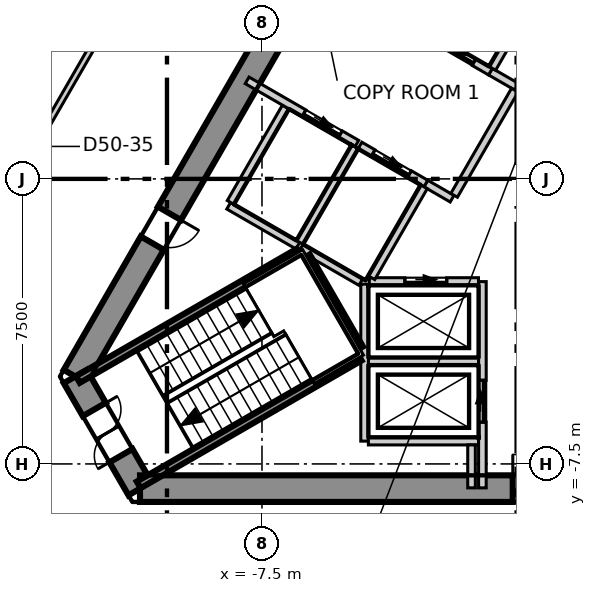
"""IFC4 building model, lengths in metres.
Left out: names, types, materials, properties, quantities, classifications, styles, units other than length and angle.
Written with IfcOpenShell. Run it as: python <this file> out.ifc"""

import sys

from ifc_helpers import new_model, si_unit, direction, frame, frame_2d, origin, place, context, subcontext, project, spatial, polyline, rectangle, outline, extrude, element, fill, save


model = new_model("IFC4")
c1 = context("Model", 3, precision=1e-05, world=origin(), true_north=direction((0.0, 1.0)))
c2 = subcontext(c1, "Body", "Model", "MODEL_VIEW")
j1 = project(units=[si_unit("LENGTHUNIT", "METRE"), si_unit("PLANEANGLEUNIT", "RADIAN")], contexts=[c1])
p1 = place(None, origin())
s1 = spatial("IfcSite", under=j1, at=p1, CompositionType="ELEMENT")
p2 = place(p1, origin())
s2 = spatial("IfcBuilding", under=s1, at=p2, CompositionType="ELEMENT")
p3 = place(p2, frame((0.0, 0.0, 215.3)))
s3 = spatial("IfcBuildingStorey", under=s2, at=p3, CompositionType="ELEMENT", Elevation=215.3)
p4 = place(p3, frame((-1.703, 13.35, -0.3), z_axis=(0.0, 0.0, 1.0), x_axis=(-0.500011533395, -0.866018744874, 0.0)))
e1 = element("IfcWall", 1, at=p4, inside=s3, PredefinedType="SHEAR", context=c2, shape_type="SweptSolid", body=[
    extrude(outline(polyline([(-0.202, -0.35), (1.782, -0.35), (3.766, -0.35), (5.75, -0.35), (7.734, -0.35), (9.718, -0.35), (11.702, -0.35), (13.686, -0.35), (15.67, -0.35), (17.654, -0.35), (19.638, -0.35), (21.622, -0.35), (21.218, 0.35), (19.307, 0.35), (17.397, 0.35), (15.486, 0.35), (13.576, 0.35), (11.665, 0.35), (9.755, 0.35), (7.844, 0.35), (5.934, 0.35), (4.023, 0.35), (2.113, 0.35), (0.202, 0.35), (-0.202, -0.35)])), origin(), (0.0, 0.0, 1.0), 4.0),
])
p5 = place(p4, frame((10.16, 0.0, 0.3)))
e2 = element("IfcOpeningElement", 2, at=p5, cuts=e1, PredefinedType="OPENING", context=c2, shape_type="SweptSolid", body=[
    extrude(rectangle(XDim=1.1, YDim=2.1, at=frame_2d((0.55, 1.05))), frame((0.0, 0.36, 0.0), z_axis=(0.0, -1.0, 0.0), x_axis=(1.0, 0.0, 0.0)), (0.0, 0.0, 1.0), 0.72),
])
p6 = place(p4, frame((16.465, 0.0, 0.3)))
e3 = element("IfcOpeningElement", 3, at=p6, cuts=e1, PredefinedType="OPENING", context=c2, shape_type="SweptSolid", body=[
    extrude(rectangle(XDim=0.9, YDim=2.1, at=frame_2d((0.45, 1.05))), frame((0.0, 0.36, 0.0), z_axis=(0.0, -1.0, 0.0), x_axis=(1.0, 0.0, 0.0)), (0.0, 0.0, 1.0), 0.72),
])
p7 = place(p4, frame((4.005, 0.0, 0.3)))
e4 = element("IfcOpeningElement", 4, at=p7, cuts=e1, PredefinedType="OPENING", context=c2, shape_type="SweptSolid", body=[
    extrude(rectangle(XDim=1.0, YDim=2.1, at=frame_2d((0.5, 1.05))), frame((0.0, 0.36, 0.0), z_axis=(0.0, -1.0, 0.0), x_axis=(1.0, 0.0, 0.0)), (0.0, 0.0, 1.0), 0.72),
])
p8 = place(p3, frame((-12.413, -5.2, -0.3), z_axis=(0.0, 0.0, 1.0), x_axis=(0.49999337185, -0.866029230515, 0.0)))
e5 = element("IfcWall", 5, at=p8, inside=s3, PredefinedType="SHEAR", context=c2, shape_type="SweptSolid", body=[
    extrude(outline(polyline([(-0.202, -0.35), (1.703, -0.35), (3.608, -0.35), (3.204, 0.35), (1.703, 0.35), (0.202, 0.35), (-0.202, -0.35)])), origin(), (0.0, 0.0, 1.0), 4.0),
])
p9 = place(p8, frame((1.003, 0.0, 0.3)))
e6 = element("IfcOpeningElement", 6, at=p9, cuts=e5, PredefinedType="OPENING", context=c2, shape_type="SweptSolid", body=[
    extrude(rectangle(XDim=1.4, YDim=2.1, at=frame_2d((0.7, 1.05))), frame((0.0, 0.36, 0.0), z_axis=(0.0, -1.0, 0.0), x_axis=(1.0, 0.0, 0.0)), (0.0, 0.0, 1.0), 0.72),
])
p10 = place(p3, frame((-10.71, -8.15, -0.3), z_axis=(0.0, 0.0, 1.0), x_axis=(1.0, 0.0, 0.0)))
e7 = element("IfcWall", 7, at=p10, inside=s3, PredefinedType="SHEAR", context=c2, shape_type="SweptSolid", body=[
    extrude(outline(polyline([(-0.202, -0.35), (1.782, -0.35), (3.766, -0.35), (5.75, -0.35), (7.734, -0.35), (9.718, -0.35), (11.702, -0.35), (13.686, -0.35), (15.67, -0.35), (17.654, -0.35), (19.638, -0.35), (21.622, -0.35), (21.218, 0.35), (19.307, 0.35), (17.397, 0.35), (15.486, 0.35), (13.576, 0.35), (11.665, 0.35), (9.755, 0.35), (7.844, 0.35), (5.934, 0.35), (4.023, 0.35), (2.113, 0.35), (0.202, 0.35), (-0.202, -0.35)])), origin(), (0.0, 0.0, 1.0), 4.0),
])
p11 = place(p10, frame((9.81, 0.0, 0.3)))
e8 = element("IfcOpeningElement", 8, at=p11, cuts=e7, PredefinedType="OPENING", context=c2, shape_type="SweptSolid", body=[
    extrude(rectangle(XDim=1.8, YDim=2.1, at=frame_2d((0.9, 1.05))), frame((0.0, 0.36, 0.0), z_axis=(0.0, -1.0, 0.0), x_axis=(1.0, 0.0, 0.0)), (0.0, 0.0, 1.0), 0.72),
])
p12 = place(p10, frame((16.921, 0.0, 0.3)))
e9 = element("IfcOpeningElement", 9, at=p12, cuts=e7, PredefinedType="OPENING", context=c2, shape_type="SweptSolid", body=[
    extrude(rectangle(XDim=0.9, YDim=2.1, at=frame_2d((0.45, 1.05))), frame((0.0, 0.36, 0.0), z_axis=(0.0, -1.0, 0.0), x_axis=(1.0, 0.0, 0.0)), (0.0, 0.0, 1.0), 0.72),
])
p13 = place(p3, frame((-2.778, 31.008, 0.0), z_axis=(0.0, 0.0, 1.0), x_axis=(-0.499999612413, -0.866025627558, 0.0)))
e10 = element("IfcWall", 10, at=p13, inside=s3, PredefinedType="ELEMENTEDWALL", context=c2, shape_type="SweptSolid", body=[
    extrude(rectangle(XDim=50.91, YDim=0.2, at=frame_2d((25.455, 0.0))), origin(), (0.0, 0.0, 1.0), 3.7),
])
p14 = place(p13, frame((2.223, 0.0, 0.9)))
e11 = element("IfcOpeningElement", 11, at=p14, cuts=e10, PredefinedType="OPENING", context=c2, shape_type="SweptSolid", body=[
    extrude(rectangle(XDim=4.2, YDim=2.5, at=frame_2d((2.1, 1.25))), frame((0.0, 0.11, 0.0), z_axis=(0.0, -1.0, 0.0), x_axis=(1.0, 0.0, 0.0)), (0.0, 0.0, 1.0), 0.22),
])
p15 = place(p13, frame((8.263, 0.0, 0.9)))
e12 = element("IfcOpeningElement", 12, at=p15, cuts=e10, PredefinedType="OPENING", context=c2, shape_type="SweptSolid", body=[
    extrude(rectangle(XDim=4.2, YDim=2.5, at=frame_2d((2.1, 1.25))), frame((0.0, 0.11, 0.0), z_axis=(0.0, -1.0, 0.0), x_axis=(1.0, 0.0, 0.0)), (0.0, 0.0, 1.0), 0.22),
])
p16 = place(p13, frame((14.304, 0.0, 0.9)))
e13 = element("IfcOpeningElement", 13, at=p16, cuts=e10, PredefinedType="OPENING", context=c2, shape_type="SweptSolid", body=[
    extrude(rectangle(XDim=4.2, YDim=2.5, at=frame_2d((2.1, 1.25))), frame((0.0, 0.11, 0.0), z_axis=(0.0, -1.0, 0.0), x_axis=(1.0, 0.0, 0.0)), (0.0, 0.0, 1.0), 0.22),
])
p17 = place(p13, frame((20.344, 0.0, 0.9)))
e14 = element("IfcOpeningElement", 14, at=p17, cuts=e10, PredefinedType="OPENING", context=c2, shape_type="SweptSolid", body=[
    extrude(rectangle(XDim=4.2, YDim=2.5, at=frame_2d((2.1, 1.25))), frame((0.0, 0.11, 0.0), z_axis=(0.0, -1.0, 0.0), x_axis=(1.0, 0.0, 0.0)), (0.0, 0.0, 1.0), 0.22),
])
p18 = place(p13, frame((26.385, 0.0, 0.9)))
e15 = element("IfcOpeningElement", 15, at=p18, cuts=e10, PredefinedType="OPENING", context=c2, shape_type="SweptSolid", body=[
    extrude(rectangle(XDim=4.2, YDim=2.5, at=frame_2d((2.1, 1.25))), frame((0.0, 0.11, 0.0), z_axis=(0.0, -1.0, 0.0), x_axis=(1.0, 0.0, 0.0)), (0.0, 0.0, 1.0), 0.22),
])
p19 = place(p13, frame((32.425, 0.0, 0.9)))
e16 = element("IfcOpeningElement", 16, at=p19, cuts=e10, PredefinedType="OPENING", context=c2, shape_type="SweptSolid", body=[
    extrude(rectangle(XDim=4.2, YDim=2.5, at=frame_2d((2.1, 1.25))), frame((0.0, 0.11, 0.0), z_axis=(0.0, -1.0, 0.0), x_axis=(1.0, 0.0, 0.0)), (0.0, 0.0, 1.0), 0.22),
])
p20 = place(p13, frame((38.466, 0.0, 0.9)))
e17 = element("IfcOpeningElement", 17, at=p20, cuts=e10, PredefinedType="OPENING", context=c2, shape_type="SweptSolid", body=[
    extrude(rectangle(XDim=4.2, YDim=2.5, at=frame_2d((2.1, 1.25))), frame((0.0, 0.11, 0.0), z_axis=(0.0, -1.0, 0.0), x_axis=(1.0, 0.0, 0.0)), (0.0, 0.0, 1.0), 0.22),
])
p21 = place(p13, frame((44.506, 0.0, 0.9)))
e18 = element("IfcOpeningElement", 18, at=p21, cuts=e10, PredefinedType="OPENING", context=c2, shape_type="SweptSolid", body=[
    extrude(rectangle(XDim=4.2, YDim=2.5, at=frame_2d((2.1, 1.25))), frame((0.0, 0.11, 0.0), z_axis=(0.0, -1.0, 0.0), x_axis=(1.0, 0.0, 0.0)), (0.0, 0.0, 1.0), 0.22),
])
p22 = place(p3, frame((-20.883, -11.97, 0.0), z_axis=(0.0, 0.0, 1.0), x_axis=(0.500006150555, 0.866021852731, 0.0)))
e19 = element("IfcWall", 19, at=p22, inside=s3, PredefinedType="PARTITIONING", context=c2, shape_type="SweptSolid", body=[
    extrude(rectangle(XDim=41.766, YDim=0.15, at=frame_2d((20.883, 0.0))), origin(), (0.0, 0.0, 1.0), 3.7),
])
p23 = place(p22, frame((36.816, 0.0, 0.0)))
e20 = element("IfcOpeningElement", 20, at=p23, cuts=e19, PredefinedType="OPENING", context=c2, shape_type="SweptSolid", body=[
    extrude(rectangle(XDim=1.1, YDim=2.1, at=frame_2d((0.55, 1.05))), frame((0.0, 0.085, 0.0), z_axis=(0.0, -1.0, 0.0), x_axis=(1.0, 0.0, 0.0)), (0.0, 0.0, 1.0), 0.17),
])
p24 = place(p22, frame((23.939, 0.0, 0.0)))
e21 = element("IfcOpeningElement", 21, at=p24, cuts=e19, PredefinedType="OPENING", context=c2, shape_type="SweptSolid", body=[
    extrude(rectangle(XDim=1.1, YDim=2.1, at=frame_2d((0.55, 1.05))), frame((0.0, 0.085, 0.0), z_axis=(0.0, -1.0, 0.0), x_axis=(1.0, 0.0, 0.0)), (0.0, 0.0, 1.0), 0.17),
])
p25 = place(p22, frame((31.139, 0.0, 0.0)))
e22 = element("IfcOpeningElement", 22, at=p25, cuts=e19, PredefinedType="OPENING", context=c2, shape_type="SweptSolid", body=[
    extrude(rectangle(XDim=0.9, YDim=2.1, at=frame_2d((0.45, 1.05))), frame((0.0, 0.085, 0.0), z_axis=(0.0, -1.0, 0.0), x_axis=(1.0, 0.0, 0.0)), (0.0, 0.0, 1.0), 0.17),
])
p26 = place(p22, frame((28.739, 0.0, 0.0)))
e23 = element("IfcOpeningElement", 23, at=p26, cuts=e19, PredefinedType="OPENING", context=c2, shape_type="SweptSolid", body=[
    extrude(rectangle(XDim=0.9, YDim=2.1, at=frame_2d((0.45, 1.05))), frame((0.0, 0.085, 0.0), z_axis=(0.0, -1.0, 0.0), x_axis=(1.0, 0.0, 0.0)), (0.0, 0.0, 1.0), 0.17),
])
p27 = place(p22, frame((14.258, 0.0, 0.0)))
e24 = element("IfcOpeningElement", 24, at=p27, cuts=e19, PredefinedType="OPENING", context=c2, shape_type="SweptSolid", body=[
    extrude(rectangle(XDim=1.1, YDim=2.1, at=frame_2d((0.55, 1.05))), frame((0.0, 0.085, 0.0), z_axis=(0.0, -1.0, 0.0), x_axis=(1.0, 0.0, 0.0)), (0.0, 0.0, 1.0), 0.17),
])
p28 = place(p22, frame((3.777, 0.0, 0.0)))
e25 = element("IfcOpeningElement", 25, at=p28, cuts=e19, PredefinedType="OPENING", context=c2, shape_type="SweptSolid", body=[
    extrude(rectangle(XDim=1.1, YDim=2.1, at=frame_2d((0.55, 1.05))), frame((0.0, 0.085, 0.0), z_axis=(0.0, -1.0, 0.0), x_axis=(1.0, 0.0, 0.0)), (0.0, 0.0, 1.0), 0.17),
])
p29 = place(p3, frame((-18.746, -3.04, 0.0), z_axis=(0.0, 0.0, 1.0), x_axis=(0.499992887898, 0.866029509919, 0.0)))
e26 = element("IfcWall", 26, at=p29, inside=s3, PredefinedType="PARTITIONING", context=c2, shape_type="SweptSolid", body=[
    extrude(rectangle(XDim=11.93, YDim=0.15, at=frame_2d((5.965, 0.0))), origin(), (0.0, 0.0, 1.0), 3.7),
])
p30 = place(p29, frame((5.456, 0.0, 0.0)))
e27 = element("IfcOpeningElement", 27, at=p30, cuts=e26, PredefinedType="OPENING", context=c2, shape_type="SweptSolid", body=[
    extrude(rectangle(XDim=1.0, YDim=2.1, at=frame_2d((0.5, 1.05))), frame((0.0, 0.085, 0.0), z_axis=(0.0, -1.0, 0.0), x_axis=(1.0, 0.0, 0.0)), (0.0, 0.0, 1.0), 0.17),
])
p31 = place(p3, frame((-8.376, -0.707, 0.0), z_axis=(0.0, 0.0, 1.0), x_axis=(0.866067520717, -0.499927044236, 0.0)))
e28 = element("IfcWall", 28, at=p31, inside=s3, PredefinedType="SOLIDWALL", context=c2, shape_type="SweptSolid", body=[
    extrude(rectangle(XDim=2.1, YDim=0.2, at=frame_2d((1.05, 0.0))), origin(), (0.0, 0.0, 1.0), 3.7),
])
p32 = place(p3, frame((-8.326, -0.62, 0.0), z_axis=(0.0, 0.0, 1.0), x_axis=(0.500023687443, 0.866011727401, 0.0)))
e29 = element("IfcWall", 29, at=p32, inside=s3, PredefinedType="SOLIDWALL", context=c2, shape_type="SweptSolid", body=[
    extrude(rectangle(XDim=2.9, YDim=0.2, at=frame_2d((1.45, 0.0))), origin(), (0.0, 0.0, 1.0), 3.7),
])
p33 = place(p3, frame((-4.7, -4.8, 0.0), z_axis=(0.0, 0.0, 1.0), x_axis=(1.0, 0.0, 0.0)))
e30 = element("IfcWall", 30, at=p33, inside=s3, PredefinedType="SOLIDWALL", context=c2, shape_type="SweptSolid", body=[
    extrude(rectangle(XDim=2.9, YDim=0.2, at=frame_2d((1.45, 0.0))), origin(), (0.0, 0.0, 1.0), 3.7),
])
p34 = place(p3, frame((-4.8, -6.9, 0.0), z_axis=(0.0, 0.0, 1.0), x_axis=(0.0, 1.0, 0.0)))
e31 = element("IfcWall", 31, at=p34, inside=s3, PredefinedType="SOLIDWALL", context=c2, shape_type="SweptSolid", body=[
    extrude(rectangle(XDim=4.131, YDim=0.2, at=frame_2d((2.065, 0.0))), origin(), (0.0, 0.0, 1.0), 3.7),
])
p35 = place(p3, frame((-4.7, -6.9, 0.0), z_axis=(0.0, 0.0, 1.0), x_axis=(1.0, 0.0, 0.0)))
e32 = element("IfcWall", 32, at=p35, inside=s3, PredefinedType="SOLIDWALL", context=c2, shape_type="SweptSolid", body=[
    extrude(rectangle(XDim=2.9, YDim=0.2, at=frame_2d((1.45, 0.0))), origin(), (0.0, 0.0, 1.0), 3.7),
])
p36 = place(p3, frame((-1.7, -8.13, 0.0), z_axis=(0.0, 0.0, 1.0), x_axis=(0.0, 1.0, 0.0)))
e33 = element("IfcWall", 33, at=p36, inside=s3, PredefinedType="SOLIDWALL", context=c2, shape_type="SweptSolid", body=[
    extrude(rectangle(XDim=5.427, YDim=0.2, at=frame_2d((2.713, 0.0))), origin(), (0.0, 0.0, 1.0), 3.7),
])
p37 = place(p36, frame((1.73, 0.0, 0.0)))
e34 = element("IfcOpeningElement", 34, at=p37, cuts=e33, PredefinedType="OPENING", context=c2, shape_type="SweptSolid", body=[
    extrude(rectangle(XDim=1.1, YDim=2.1, at=frame_2d((0.55, 1.05))), frame((0.0, 0.11, 0.0), z_axis=(0.0, -1.0, 0.0), x_axis=(1.0, 0.0, 0.0)), (0.0, 0.0, 1.0), 0.22),
])
p38 = place(p3, frame((-4.676, -2.7, 0.0), z_axis=(0.0, 0.0, 1.0), x_axis=(1.0, 0.0, 0.0)))
e35 = element("IfcWall", 35, at=p38, inside=s3, PredefinedType="SOLIDWALL", context=c2, shape_type="SweptSolid", body=[
    extrude(rectangle(XDim=2.873, YDim=0.2, at=frame_2d((1.437, 0.0))), origin(), (0.0, 0.0, 1.0), 3.7),
])
p39 = place(p38, frame((0.937, 0.0, 0.0)))
e36 = element("IfcOpeningElement", 36, at=p39, cuts=e35, PredefinedType="OPENING", context=c2, shape_type="SweptSolid", body=[
    extrude(rectangle(XDim=1.1, YDim=2.1, at=frame_2d((0.55, 1.05))), frame((0.0, 0.11, 0.0), z_axis=(0.0, -1.0, 0.0), x_axis=(1.0, 0.0, 0.0)), (0.0, 0.0, 1.0), 0.22),
])
p40 = place(p3, frame((-7.891, 2.593, 0.0), z_axis=(0.0, 0.0, 1.0), x_axis=(0.866070917804, -0.499921159118, 0.0)))
e37 = element("IfcWall", 37, at=p40, inside=s3, PredefinedType="SOLIDWALL", context=c2, shape_type="SweptSolid", body=[
    extrude(rectangle(XDim=3.333, YDim=0.2, at=frame_2d((1.666, 0.0))), origin(), (0.0, 0.0, 1.0), 3.7),
])
p41 = place(p40, frame((1.73, 0.0, 0.0)))
e38 = element("IfcOpeningElement", 38, at=p41, cuts=e37, PredefinedType="OPENING", context=c2, shape_type="SweptSolid", body=[
    extrude(rectangle(XDim=1.1, YDim=2.1, at=frame_2d((0.55, 1.05))), frame((0.0, 0.11, 0.0), z_axis=(0.0, -1.0, 0.0), x_axis=(1.0, 0.0, 0.0)), (0.0, 0.0, 1.0), 0.22),
])
p42 = place(p3, frame((-3.188, -0.122, 0.0), z_axis=(0.0, 0.0, 1.0), x_axis=(0.865705793592, -0.50055317294, 0.0)))
e39 = element("IfcWall", 39, at=p42, inside=s3, PredefinedType="SOLIDWALL", context=c2, shape_type="SweptSolid", body=[
    extrude(rectangle(XDim=0.797, YDim=0.2, at=frame_2d((0.398, 0.0))), origin(), (0.0, 0.0, 1.0), 3.7),
])
p43 = place(p3, frame((-1.488, 2.822, 0.0), z_axis=(0.0, 0.0, 1.0), x_axis=(0.866236612152, -0.499633997809, 0.0)))
e40 = element("IfcWall", 40, at=p43, inside=s3, PredefinedType="SOLIDWALL", context=c2, shape_type="SweptSolid", body=[
    extrude(rectangle(XDim=0.796, YDim=0.2, at=frame_2d((0.398, 0.0))), origin(), (0.0, 0.0, 1.0), 3.7),
])
p44 = place(p3, frame((-2.444, -0.433, 0.0), z_axis=(0.0, 0.0, 1.0), x_axis=(0.500035624827, 0.866004834804, 0.0)))
e41 = element("IfcWall", 41, at=p44, inside=s3, PredefinedType="SOLIDWALL", context=c2, shape_type="SweptSolid", body=[
    extrude(rectangle(XDim=3.194, YDim=0.2, at=frame_2d((1.597, 0.0))), origin(), (0.0, 0.0, 1.0), 3.7),
])
p45 = place(p3, frame((-6.507, -1.67, 0.0), z_axis=(0.0, 0.0, 1.0), x_axis=(0.50012328804, 0.865954211699, 0.0)))
e42 = element("IfcWall", 42, at=p45, inside=s3, PredefinedType="SOLIDWALL", context=c2, shape_type="SweptSolid", body=[
    extrude(rectangle(XDim=2.9, YDim=0.2, at=frame_2d((1.45, 0.0))), origin(), (0.0, 0.0, 1.0), 3.7),
])
p46 = place(p3, frame((-6.47, -1.807, 0.0), z_axis=(0.0, 0.0, 1.0), x_axis=(0.865883195159, -0.500246231712, 0.0)))
e43 = element("IfcWall", 43, at=p46, inside=s3, PredefinedType="SOLIDWALL", context=c2, shape_type="SweptSolid", body=[
    extrude(rectangle(XDim=1.815, YDim=0.2, at=frame_2d((0.908, 0.0))), origin(), (0.0, 0.0, 1.0), 3.7),
])
p47 = place(p3, frame((-4.922, 0.879, 0.0), z_axis=(0.0, 0.0, 1.0), x_axis=(0.866073918653, -0.499915960366, 0.0)))
e44 = element("IfcWall", 44, at=p47, inside=s3, PredefinedType="SOLIDWALL", context=c2, shape_type="SweptSolid", body=[
    extrude(rectangle(XDim=2.002, YDim=0.2, at=frame_2d((1.001, 0.0))), origin(), (0.0, 0.0, 1.0), 3.7),
])
p48 = place(p47, frame((0.402, 0.0, 0.0)))
e45 = element("IfcOpeningElement", 45, at=p48, cuts=e44, PredefinedType="OPENING", context=c2, shape_type="SweptSolid", body=[
    extrude(rectangle(XDim=1.1, YDim=2.1, at=frame_2d((0.55, 1.05))), frame((0.0, 0.11, 0.0), z_axis=(0.0, -1.0, 0.0), x_axis=(1.0, 0.0, 0.0)), (0.0, 0.0, 1.0), 0.22),
])
p49 = place(p3, frame((-4.619, -2.6, 0.0), z_axis=(0.0, 0.0, 1.0), x_axis=(0.50009492287, 0.865970593103, 0.0)))
e46 = element("IfcWall", 46, at=p49, inside=s3, PredefinedType="SOLIDWALL", context=c2, shape_type="SweptSolid", body=[
    extrude(rectangle(XDim=2.761, YDim=0.2, at=frame_2d((1.381, 0.0))), origin(), (0.0, 0.0, 1.0), 3.7),
])
p50 = place(p3, frame((-3.309, 3.873, 0.0), z_axis=(0.0, 0.0, 1.0), x_axis=(0.866098583652, -0.499873227325, 0.0)))
e47 = element("IfcWall", 47, at=p50, inside=s3, PredefinedType="SOLIDWALL", context=c2, shape_type="SweptSolid", body=[
    extrude(rectangle(XDim=2.103, YDim=0.2, at=frame_2d((1.051, 0.0))), origin(), (0.0, 0.0, 1.0), 3.7),
])
p51 = place(p50, frame((0.502, 0.0, 0.0)))
e48 = element("IfcOpeningElement", 48, at=p51, cuts=e47, PredefinedType="OPENING", context=c2, shape_type="SweptSolid", body=[
    extrude(rectangle(XDim=1.1, YDim=2.1, at=frame_2d((0.55, 1.05))), frame((0.0, 0.11, 0.0), z_axis=(0.0, -1.0, 0.0), x_axis=(1.0, 0.0, 0.0)), (0.0, 0.0, 1.0), 0.22),
])
p52 = place(p3, frame((-1.438, 2.909, 0.0), z_axis=(0.0, 0.0, 1.0), x_axis=(0.499829630636, 0.866123744241, 0.0)))
e49 = element("IfcWall", 49, at=p52, inside=s3, PredefinedType="SOLIDWALL", context=c2, shape_type="SweptSolid", body=[
    extrude(rectangle(XDim=2.761, YDim=0.2, at=frame_2d((1.38, 0.0))), origin(), (0.0, 0.0, 1.0), 3.7),
])
p53 = place(p3, frame((-1.986, -8.13, 0.0), z_axis=(0.0, 0.0, 1.0), x_axis=(0.0, 1.0, 0.0)))
e50 = element("IfcWall", 50, at=p53, inside=s3, PredefinedType="SOLIDWALL", context=c2, shape_type="SweptSolid", body=[
    extrude(rectangle(XDim=1.13, YDim=0.2, at=frame_2d((0.565, 0.0))), origin(), (0.0, 0.0, 1.0), 3.7),
])
p54 = place(p3, frame((-12.344, -5.279, 0.0), z_axis=(0.0, 0.0, 1.0), x_axis=(0.866046323291, 0.499963764601, 0.0)))
e51 = element("IfcWall", 51, at=p54, inside=s3, PredefinedType="SOLIDWALL", context=c2, shape_type="SweptSolid", body=[
    extrude(rectangle(XDim=6.714, YDim=0.2, at=frame_2d((3.357, 0.0))), origin(), (0.0, 0.0, 1.0), 3.7),
])
p55 = place(p3, frame((-6.329, -2.038, 0.0), z_axis=(0.0, 0.0, 1.0), x_axis=(0.500200581029, -0.865909567298, 0.0)))
e52 = element("IfcWall", 52, at=p55, inside=s3, PredefinedType="SOLIDWALL", context=c2, shape_type="SweptSolid", body=[
    extrude(rectangle(XDim=2.799, YDim=0.2, at=frame_2d((1.399, 0.0))), origin(), (0.0, 0.0, 1.0), 3.7),
])
p56 = place(p3, frame((-10.744, -8.051, 0.0), z_axis=(0.0, 0.0, 1.0), x_axis=(0.865983344943, 0.500072840975, 0.0)))
e53 = element("IfcWall", 53, at=p56, inside=s3, PredefinedType="SOLIDWALL", context=c2, shape_type="SweptSolid", body=[
    extrude(rectangle(XDim=6.715, YDim=0.2, at=frame_2d((3.357, 0.0))), origin(), (0.0, 0.0, 1.0), 3.7),
])
p57 = place(p39, origin())
e54 = element("IfcDoor", 54, at=p57, inside=s3, OperationType="SLIDING_TO_LEFT", PredefinedType="DOOR", context=c2, shape_type="SweptSolid", body=[
    extrude(rectangle(XDim=1.1, YDim=2.1, at=frame_2d((0.55, 1.05))), frame((0.0, 0.025, 0.0), z_axis=(0.0, -1.0, 0.0), x_axis=(1.0, 0.0, 0.0)), (0.0, 0.0, 1.0), 0.05),
])
fill(e36, e54)
p58 = place(p37, origin())
e55 = element("IfcDoor", 55, at=p58, inside=s3, OperationType="SLIDING_TO_LEFT", PredefinedType="DOOR", context=c2, shape_type="SweptSolid", body=[
    extrude(rectangle(XDim=1.1, YDim=2.1, at=frame_2d((0.55, 1.05))), frame((0.0, 0.025, 0.0), z_axis=(0.0, -1.0, 0.0), x_axis=(1.0, 0.0, 0.0)), (0.0, 0.0, 1.0), 0.05),
])
fill(e34, e55)
p59 = place(p48, origin())
e56 = element("IfcDoor", 56, at=p59, inside=s3, OperationType="SLIDING_TO_LEFT", PredefinedType="DOOR", context=c2, shape_type="SweptSolid", body=[
    extrude(rectangle(XDim=1.1, YDim=2.1, at=frame_2d((0.55, 1.05))), frame((0.0, 0.025, 0.0), z_axis=(0.0, -1.0, 0.0), x_axis=(1.0, 0.0, 0.0)), (0.0, 0.0, 1.0), 0.05),
])
fill(e45, e56)
p60 = place(p51, origin())
e57 = element("IfcDoor", 57, at=p60, inside=s3, OperationType="SLIDING_TO_LEFT", PredefinedType="DOOR", context=c2, shape_type="SweptSolid", body=[
    extrude(rectangle(XDim=1.1, YDim=2.1, at=frame_2d((0.55, 1.05))), frame((0.0, 0.025, 0.0), z_axis=(0.0, -1.0, 0.0), x_axis=(1.0, 0.0, 0.0)), (0.0, 0.0, 1.0), 0.05),
])
fill(e48, e57)
p61 = place(p41, origin())
e58 = element("IfcDoor", 58, at=p61, inside=s3, OperationType="SLIDING_TO_LEFT", PredefinedType="DOOR", context=c2, shape_type="SweptSolid", body=[
    extrude(rectangle(XDim=1.1, YDim=2.1, at=frame_2d((0.55, 1.05))), frame((0.0, 0.025, 0.0), z_axis=(0.0, -1.0, 0.0), x_axis=(1.0, 0.0, 0.0)), (0.0, 0.0, 1.0), 0.05),
])
fill(e38, e58)
p62 = place(p11, origin())
e59 = element("IfcDoor", 59, at=p62, inside=s3, OperationType="DOUBLE_DOOR_SINGLE_SWING", PredefinedType="DOOR", context=c2, shape_type="SweptSolid", body=[
    extrude(rectangle(XDim=1.8, YDim=2.1, at=frame_2d((0.9, 1.05))), frame((0.0, 0.025, 0.0), z_axis=(0.0, -1.0, 0.0), x_axis=(1.0, 0.0, 0.0)), (0.0, 0.0, 1.0), 0.05),
])
fill(e8, e59)
p63 = place(p9, origin())
e60 = element("IfcDoor", 60, at=p63, inside=s3, OperationType="DOUBLE_DOOR_SINGLE_SWING", PredefinedType="DOOR", context=c2, shape_type="SweptSolid", body=[
    extrude(rectangle(XDim=1.4, YDim=2.1, at=frame_2d((0.7, 1.05))), frame((0.0, 0.025, 0.0), z_axis=(0.0, -1.0, 0.0), x_axis=(1.0, 0.0, 0.0)), (0.0, 0.0, 1.0), 0.05),
])
fill(e6, e60)
p64 = place(p6, origin())
e61 = element("IfcDoor", 61, at=p64, inside=s3, OperationType="SINGLE_SWING_RIGHT", PredefinedType="DOOR", context=c2, shape_type="SweptSolid", body=[
    extrude(rectangle(XDim=0.9, YDim=2.1, at=frame_2d((0.45, 1.05))), frame((0.0, 0.025, 0.0), z_axis=(0.0, -1.0, 0.0), x_axis=(1.0, 0.0, 0.0)), (0.0, 0.0, 1.0), 0.05),
])
fill(e3, e61)
save(model, sys.argv[1])
